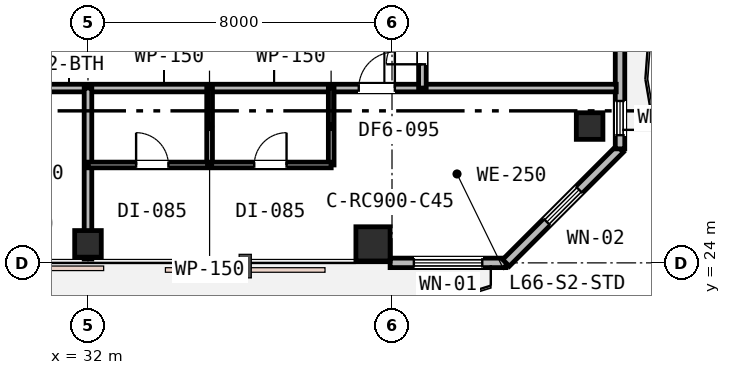
"""IFC4 building model, lengths in metres.
Left out: names, types, materials, properties, quantities, classifications, styles, units other than length and angle.
Written with IfcOpenShell. Run it as: python <this file> out.ifc"""

import sys

from ifc_helpers import new_model, si_unit, direction, frame, frame_2d, origin, origin_2d, place, context, subcontext, project, spatial, rectangle, extrude, element, fill, save


model = new_model("IFC4")
c1 = context("Model", 3, precision=1e-05, world=origin(), true_north=direction((0.0, 1.0)))
c2 = subcontext(c1, "Body", "Model", "MODEL_VIEW")
j1 = project(units=[si_unit("LENGTHUNIT", "METRE"), si_unit("PLANEANGLEUNIT", "RADIAN")], contexts=[c1])
p1 = place(None, origin())
s1 = spatial("IfcSite", under=j1, at=p1, CompositionType="ELEMENT")
p2 = place(p1, origin())
s2 = spatial("IfcBuilding", under=s1, at=p2, CompositionType="ELEMENT")
p3 = place(p2, frame((0.0, 0.0, 256.4)))
s3 = spatial("IfcBuildingStorey", under=s2, at=p3, CompositionType="ELEMENT", Elevation=256.4)
p4 = place(p3, frame((32.0, 24.5, 0.0), z_axis=(0.0, 0.0, 1.0), x_axis=(1.0, 0.0, 0.0)))
e1 = element("IfcColumn", 1, at=p4, inside=s3, PredefinedType="COLUMN", context=c2, shape_type="SweptSolid", body=[
    extrude(rectangle(XDim=0.7, YDim=0.7, at=origin_2d()), origin(), (0.0, 0.0, 1.0), 3.8),
])
p5 = place(p3, frame((39.5, 24.5, 0.0), z_axis=(0.0, 0.0, 1.0), x_axis=(1.0, 0.0, 0.0)))
e2 = element("IfcColumn", 2, at=p5, inside=s3, PredefinedType="COLUMN", context=c2, shape_type="SweptSolid", body=[
    extrude(rectangle(XDim=0.9, YDim=0.9, at=origin_2d()), origin(), (0.0, 0.0, 1.0), 3.8),
])
p6 = place(p3, frame((45.2, 27.6, 0.0), z_axis=(0.0, 0.0, 1.0), x_axis=(1.0, 0.0, 0.0)))
e3 = element("IfcColumn", 3, at=p6, inside=s3, PredefinedType="COLUMN", context=c2, shape_type="SweptSolid", body=[
    extrude(rectangle(XDim=0.7, YDim=0.7, at=origin_2d()), origin(), (0.0, 0.0, 1.0), 3.8),
])
p7 = place(p3, frame((39.95, 24.0, 0.0), z_axis=(0.0, 0.0, 1.0), x_axis=(1.0, 0.0, 0.0)))
e4 = element("IfcWall", 4, at=p7, inside=s3, PredefinedType="STANDARD", context=c2, shape_type="SweptSolid", body=[
    extrude(rectangle(XDim=3.05, YDim=0.25, at=frame_2d((1.525, 0.0))), origin(), (0.0, 0.0, 1.0), 3.53),
])
p8 = place(p7, frame((0.625, 0.0, 0.75)))
e5 = element("IfcOpeningElement", 5, at=p8, cuts=e4, PredefinedType="OPENING", context=c2, shape_type="SweptSolid", body=[
    extrude(rectangle(XDim=1.8, YDim=1.85, at=frame_2d((0.9, 0.925))), frame((0.0, 0.135, 0.0), z_axis=(0.0, -1.0, 0.0), x_axis=(1.0, 0.0, 0.0)), (0.0, 0.0, 1.0), 0.27),
])
p9 = place(p3, frame((43.0, 24.0, 0.0), z_axis=(0.0, 0.0, 1.0), x_axis=(0.707106781187, 0.707106781187, 0.0)))
e6 = element("IfcWall", 6, at=p9, inside=s3, PredefinedType="STANDARD", context=c2, shape_type="SweptSolid", body=[
    extrude(rectangle(XDim=4.243, YDim=0.25, at=frame_2d((2.121, 0.0))), origin(), (0.0, 0.0, 1.0), 3.53),
])
p10 = place(p9, frame((1.521, 0.0, 0.85)))
e7 = element("IfcOpeningElement", 7, at=p10, cuts=e6, PredefinedType="OPENING", context=c2, shape_type="SweptSolid", body=[
    extrude(rectangle(XDim=1.2, YDim=1.6, at=frame_2d((0.6, 0.8))), frame((0.0, 0.135, 0.0), z_axis=(0.0, -1.0, 0.0), x_axis=(1.0, 0.0, 0.0)), (0.0, 0.0, 1.0), 0.27),
])
p11 = place(p3, frame((46.0, 27.0, 0.0), z_axis=(0.0, 0.0, 1.0), x_axis=(0.0, 1.0, 0.0)))
e8 = element("IfcWall", 8, at=p11, inside=s3, PredefinedType="STANDARD", context=c2, shape_type="SweptSolid", body=[
    extrude(rectangle(XDim=2.9, YDim=0.25, at=frame_2d((1.45, 0.0))), origin(), (0.0, 0.0, 1.0), 3.53),
])
p12 = place(p11, frame((0.36, 0.0, 0.9)))
e9 = element("IfcOpeningElement", 9, at=p12, cuts=e8, PredefinedType="OPENING", context=c2, shape_type="SweptSolid", body=[
    extrude(rectangle(XDim=0.9, YDim=1.55, at=frame_2d((0.45, 0.775))), frame((0.0, 0.135, 0.0), z_axis=(0.0, -1.0, 0.0), x_axis=(1.0, 0.0, 0.0)), (0.0, 0.0, 1.0), 0.27),
])
p13 = place(p3, frame((21.6, 28.6, 0.0), z_axis=(0.0, 0.0, 1.0), x_axis=(1.0, 0.0, 0.0)))
e10 = element("IfcWall", 10, at=p13, inside=s3, PredefinedType="PARTITIONING", context=c2, shape_type="SweptSolid", body=[
    extrude(rectangle(XDim=24.3, YDim=0.2, at=frame_2d((12.15, 0.0))), origin(), (0.0, 0.0, 1.0), 3.16),
])
p14 = place(p13, frame((5.925, 0.0, 0.0)))
e11 = element("IfcOpeningElement", 11, at=p14, cuts=e10, PredefinedType="OPENING", context=c2, shape_type="SweptSolid", body=[
    extrude(rectangle(XDim=0.95, YDim=2.15, at=frame_2d((0.475, 1.075))), frame((0.0, 0.11, 0.0), z_axis=(0.0, -1.0, 0.0), x_axis=(1.0, 0.0, 0.0)), (0.0, 0.0, 1.0), 0.22),
])
p15 = place(p13, frame((17.525, 0.0, 0.0)))
e12 = element("IfcOpeningElement", 12, at=p15, cuts=e10, PredefinedType="OPENING", context=c2, shape_type="SweptSolid", body=[
    extrude(rectangle(XDim=0.95, YDim=2.15, at=frame_2d((0.475, 1.075))), frame((0.0, 0.11, 0.0), z_axis=(0.0, -1.0, 0.0), x_axis=(1.0, 0.0, 0.0)), (0.0, 0.0, 1.0), 0.22),
])
p16 = place(p3, frame((40.8, 28.6, 0.0), z_axis=(0.0, 0.0, 1.0), x_axis=(0.0, 1.0, 0.0)))
e13 = element("IfcWall", 13, at=p16, inside=s3, PredefinedType="PARTITIONING", context=c2, shape_type="SweptSolid", body=[
    extrude(rectangle(XDim=14.3, YDim=0.2, at=frame_2d((7.15, 0.0))), origin(), (0.0, 0.0, 1.0), 3.16),
])
p17 = place(p16, frame((0.625, 0.0, 0.0)))
e14 = element("IfcOpeningElement", 14, at=p17, cuts=e13, PredefinedType="OPENING", context=c2, shape_type="SweptSolid", body=[
    extrude(rectangle(XDim=0.95, YDim=2.15, at=frame_2d((0.475, 1.075))), frame((0.0, 0.11, 0.0), z_axis=(0.0, -1.0, 0.0), x_axis=(1.0, 0.0, 0.0)), (0.0, 0.0, 1.0), 0.22),
])
p18 = place(p3, frame((32.0, 24.1, 0.0), z_axis=(0.0, 0.0, 1.0), x_axis=(0.0, 1.0, 0.0)))
e15 = element("IfcWall", 15, at=p18, inside=s3, PredefinedType="PARTITIONING", context=c2, shape_type="SweptSolid", body=[
    extrude(rectangle(XDim=4.5, YDim=0.2, at=frame_2d((2.25, 0.0))), origin(), (0.0, 0.0, 1.0), 3.16),
])
for number, where, z_axis, x_axis in (
    (16, (38.4, 26.576, 0.0), (0.0, 0.0, 1.0), (0.0, 1.0, 0.0)),
    (17, (35.2, 26.576, 0.0), (0.0, 0.0, 1.0), (0.0, 1.0, 0.0)),
):
    element("IfcWall", number, at=place(p3, frame(where, z_axis=z_axis, x_axis=x_axis)), inside=s3, PredefinedType="PARTITIONING", context=c2, shape_type="SweptSolid", body=[
        extrude(rectangle(XDim=2.024, YDim=0.15, at=frame_2d((1.012, 0.0))), origin(), (0.0, 0.0, 1.0), 3.53),
    ])
p19 = place(p3, frame((32.0, 26.576, 0.0), z_axis=(0.0, 0.0, 1.0), x_axis=(1.0, 0.0, 0.0)))
e18 = element("IfcWall", 18, at=p19, inside=s3, PredefinedType="PARTITIONING", context=c2, shape_type="SweptSolid", body=[
    extrude(rectangle(XDim=6.4, YDim=0.15, at=frame_2d((3.2, 0.0))), origin(), (0.0, 0.0, 1.0), 3.16),
])
p20 = place(p19, frame((1.266, 0.0, 0.0)))
e19 = element("IfcOpeningElement", 19, at=p20, cuts=e18, PredefinedType="OPENING", context=c2, shape_type="SweptSolid", body=[
    extrude(rectangle(XDim=0.85, YDim=2.15, at=frame_2d((0.425, 1.075))), frame((0.0, 0.085, 0.0), z_axis=(0.0, -1.0, 0.0), x_axis=(1.0, 0.0, 0.0)), (0.0, 0.0, 1.0), 0.17),
])
p21 = place(p19, frame((4.375, 0.0, 0.0)))
e20 = element("IfcOpeningElement", 20, at=p21, cuts=e18, PredefinedType="OPENING", context=c2, shape_type="SweptSolid", body=[
    extrude(rectangle(XDim=0.85, YDim=2.15, at=frame_2d((0.425, 1.075))), frame((0.0, 0.085, 0.0), z_axis=(0.0, -1.0, 0.0), x_axis=(1.0, 0.0, 0.0)), (0.0, 0.0, 1.0), 0.17),
])
p22 = place(p8, origin())
e21 = element("IfcWindow", 21, at=p22, inside=s3, PartitioningType="SINGLE_PANEL", PredefinedType="WINDOW", context=c2, shape_type="SweptSolid", body=[
    extrude(rectangle(XDim=1.8, YDim=1.85, at=frame_2d((0.9, 0.925))), frame((0.0, 0.03, 0.0), z_axis=(0.0, -1.0, 0.0), x_axis=(1.0, 0.0, 0.0)), (0.0, 0.0, 1.0), 0.06),
])
fill(e5, e21)
p23 = place(p10, origin())
e22 = element("IfcWindow", 22, at=p23, inside=s3, PartitioningType="SINGLE_PANEL", PredefinedType="WINDOW", context=c2, shape_type="SweptSolid", body=[
    extrude(rectangle(XDim=1.2, YDim=1.6, at=frame_2d((0.6, 0.8))), frame((0.0, 0.03, 0.0), z_axis=(0.0, -1.0, 0.0), x_axis=(1.0, 0.0, 0.0)), (0.0, 0.0, 1.0), 0.06),
])
fill(e7, e22)
p24 = place(p12, origin())
e23 = element("IfcWindow", 23, at=p24, inside=s3, PartitioningType="SINGLE_PANEL", PredefinedType="WINDOW", context=c2, shape_type="SweptSolid", body=[
    extrude(rectangle(XDim=0.9, YDim=1.55, at=frame_2d((0.45, 0.775))), frame((0.0, 0.03, 0.0), z_axis=(0.0, -1.0, 0.0), x_axis=(1.0, 0.0, 0.0)), (0.0, 0.0, 1.0), 0.06),
])
fill(e9, e23)
p25 = place(p17, origin())
e24 = element("IfcDoor", 24, at=p25, inside=s3, OperationType="SINGLE_SWING_LEFT", PredefinedType="DOOR", context=c2, shape_type="SweptSolid", body=[
    extrude(rectangle(XDim=0.95, YDim=2.15, at=frame_2d((0.475, 1.075))), frame((0.0, 0.025, 0.0), z_axis=(0.0, -1.0, 0.0), x_axis=(1.0, 0.0, 0.0)), (0.0, 0.0, 1.0), 0.05),
])
fill(e14, e24)
p26 = place(p15, origin())
e25 = element("IfcDoor", 25, at=p26, inside=s3, OperationType="SINGLE_SWING_RIGHT", PredefinedType="DOOR", context=c2, shape_type="SweptSolid", body=[
    extrude(rectangle(XDim=0.95, YDim=2.15, at=frame_2d((0.475, 1.075))), frame((0.0, 0.025, 0.0), z_axis=(0.0, -1.0, 0.0), x_axis=(1.0, 0.0, 0.0)), (0.0, 0.0, 1.0), 0.05),
])
fill(e12, e25)
p27 = place(p20, origin())
e26 = element("IfcDoor", 26, at=p27, inside=s3, OperationType="SINGLE_SWING_LEFT", PredefinedType="DOOR", context=c2, shape_type="SweptSolid", body=[
    extrude(rectangle(XDim=0.85, YDim=2.15, at=frame_2d((0.425, 1.075))), frame((0.0, 0.025, 0.0), z_axis=(0.0, -1.0, 0.0), x_axis=(1.0, 0.0, 0.0)), (0.0, 0.0, 1.0), 0.05),
])
fill(e19, e26)
p28 = place(p21, origin())
e27 = element("IfcDoor", 27, at=p28, inside=s3, OperationType="SINGLE_SWING_RIGHT", PredefinedType="DOOR", context=c2, shape_type="SweptSolid", body=[
    extrude(rectangle(XDim=0.85, YDim=2.15, at=frame_2d((0.425, 1.075))), frame((0.0, 0.025, 0.0), z_axis=(0.0, -1.0, 0.0), x_axis=(1.0, 0.0, 0.0)), (0.0, 0.0, 1.0), 0.05),
])
fill(e20, e27)
save(model, sys.argv[1])
